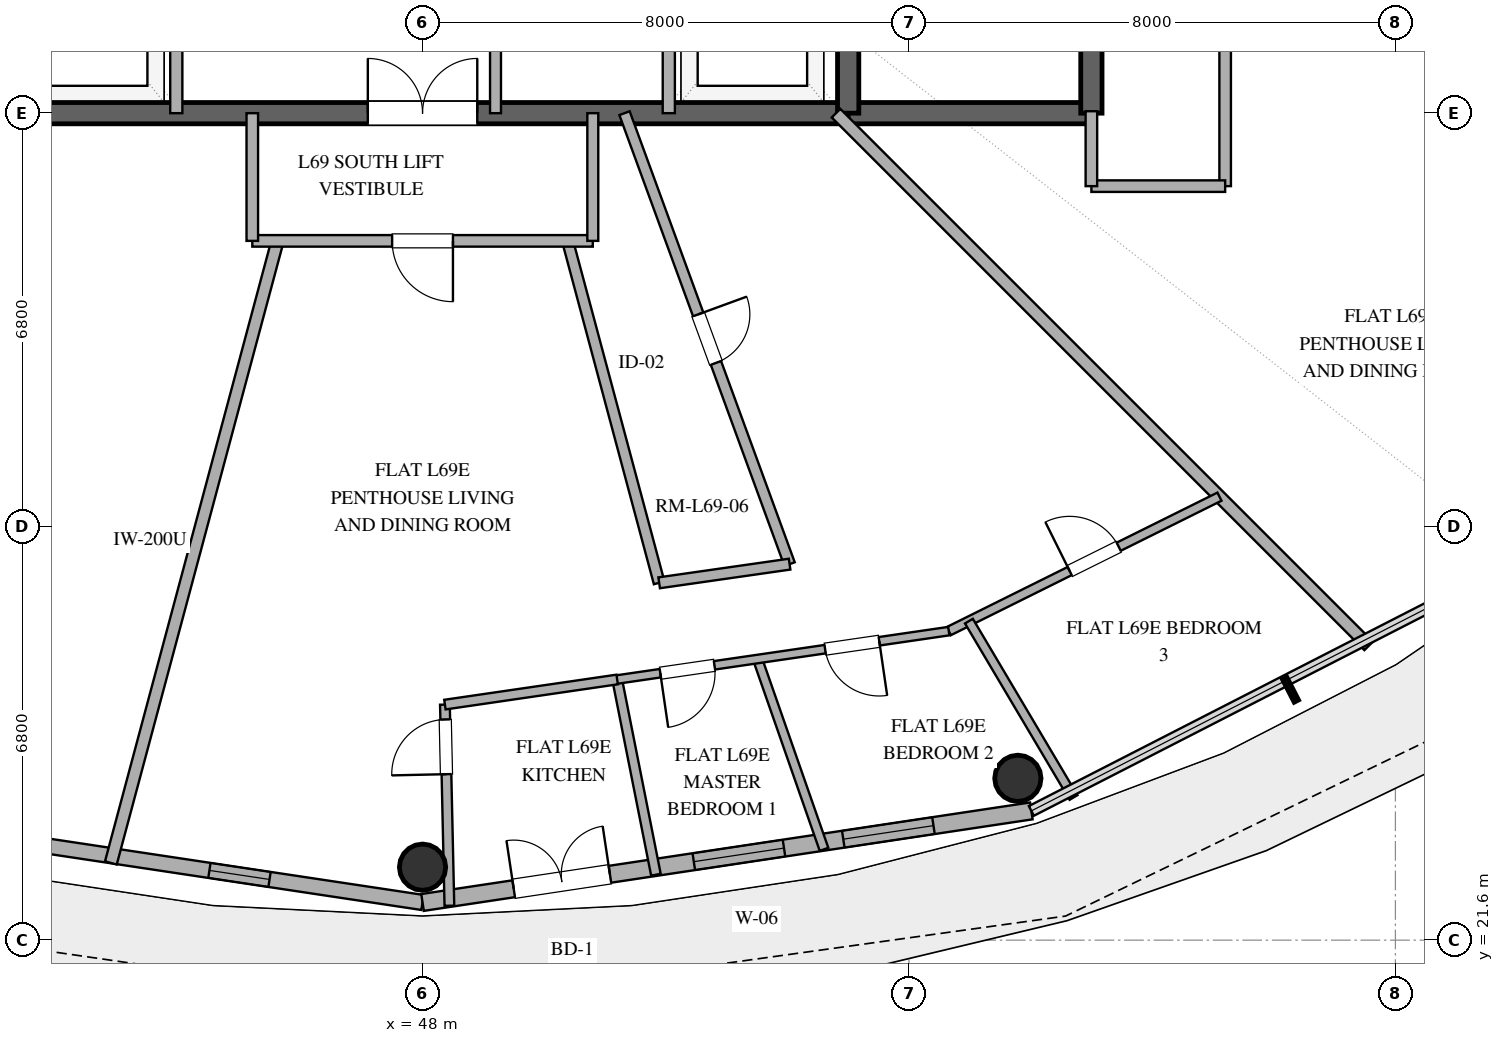
"""IFC4 building model, lengths in metres.
Left out: names, types, materials, properties, quantities, classifications, styles, units other than length and angle.
Written with IfcOpenShell. Run it as: python <this file> out.ifc"""

import sys

from ifc_helpers import new_model, si_unit, direction, frame, frame_2d, origin, origin_2d, place, context, subcontext, project, spatial, rectangle, hollow_circle, extrude, element, fill, save


model = new_model("IFC4")
c1 = context("Model", 3, precision=1e-05, world=origin(), true_north=direction((0.0, 1.0)))
c2 = subcontext(c1, "Body", "Model", "MODEL_VIEW")
j1 = project(units=[si_unit("LENGTHUNIT", "METRE"), si_unit("PLANEANGLEUNIT", "RADIAN")], contexts=[c1])
p1 = place(None, origin())
s1 = spatial("IfcSite", under=j1, at=p1, CompositionType="ELEMENT")
p2 = place(p1, origin())
s2 = spatial("IfcBuilding", under=s1, at=p2, CompositionType="ELEMENT")
p3 = place(p2, frame((0.0, 0.0, 269.4)))
s3 = spatial("IfcBuildingStorey", under=s2, at=p3, CompositionType="ELEMENT", Elevation=269.4)
p4 = place(p3, frame((41.0, 35.2, 0.0), z_axis=(0.0, 0.0, 1.0), x_axis=(1.0, 0.0, 0.0)))
e1 = element("IfcWall", 1, at=p4, inside=s3, PredefinedType="SHEAR", context=c2, shape_type="SweptSolid", body=[
    extrude(rectangle(XDim=14.0, YDim=0.35, at=frame_2d((7.0, 0.0))), origin(), (0.0, 0.0, 1.0), 3.37),
])
p5 = place(p4, frame((6.1, 0.0, 0.0)))
e2 = element("IfcOpeningElement", 2, at=p5, cuts=e1, PredefinedType="OPENING", context=c2, shape_type="SweptSolid", body=[
    extrude(rectangle(XDim=1.8, YDim=2.25, at=frame_2d((0.9, 1.125))), frame((0.0, 0.185, 0.0), z_axis=(0.0, -1.0, 0.0), x_axis=(1.0, 0.0, 0.0)), (0.0, 0.0, 1.0), 0.37),
])
p6 = place(p3, frame((55.0, 35.2, 0.0), z_axis=(0.0, 0.0, 1.0), x_axis=(1.0, 0.0, 0.0)))
e3 = element("IfcWall", 3, at=p6, inside=s3, PredefinedType="SHEAR", context=c2, shape_type="SweptSolid", body=[
    extrude(rectangle(XDim=4.0, YDim=0.35, at=frame_2d((2.0, 0.0))), origin(), (0.0, 0.0, 1.0), 3.37),
])
p7 = place(p3, frame((59.0, 35.2, 0.0), z_axis=(0.0, 0.0, 1.0), x_axis=(0.0, 1.0, 0.0)))
e4 = element("IfcWall", 4, at=p7, inside=s3, PredefinedType="SHEAR", context=c2, shape_type="SweptSolid", body=[
    extrude(rectangle(XDim=13.6, YDim=0.35, at=frame_2d((6.8, 0.0))), origin(), (0.0, 0.0, 1.0), 3.37),
])
p8 = place(p7, frame((1.5, 0.0, 0.0)))
e5 = element("IfcOpeningElement", 5, at=p8, cuts=e4, PredefinedType="OPENING", context=c2, shape_type="SweptSolid", body=[
    extrude(rectangle(XDim=1.2, YDim=2.15, at=frame_2d((0.6, 1.075))), frame((0.0, 0.185, 0.0), z_axis=(0.0, -1.0, 0.0), x_axis=(1.0, 0.0, 0.0)), (0.0, 0.0, 1.0), 0.37),
])
p9 = place(p3, frame((55.0, 35.2, 0.0), z_axis=(0.0, 0.0, 1.0), x_axis=(0.0, 1.0, 0.0)))
e6 = element("IfcWall", 6, at=p9, inside=s3, PredefinedType="SHEAR", context=c2, shape_type="SweptSolid", body=[
    extrude(rectangle(XDim=13.6, YDim=0.35, at=frame_2d((6.8, 0.0))), origin(), (0.0, 0.0, 1.0), 3.37),
])
p10 = place(p9, frame((1.15, 0.0, 0.0)))
e7 = element("IfcOpeningElement", 7, at=p10, cuts=e6, PredefinedType="OPENING", context=c2, shape_type="SweptSolid", body=[
    extrude(rectangle(XDim=1.1, YDim=2.2, at=frame_2d((0.55, 1.1))), frame((0.0, 0.185, 0.0), z_axis=(0.0, -1.0, 0.0), x_axis=(1.0, 0.0, 0.0)), (0.0, 0.0, 1.0), 0.37),
])
for number, where, z_axis, x_axis in (
    (8, (48.0, 22.8, 0.0), (0.0, 0.0, 1.0), (1.0, 0.0, 0.0)),
    (9, (57.791, 24.261, 0.0), (0.0, 0.0, 1.0), (1.0, 0.0, 0.0)),
):
    element("IfcColumn", number, at=place(p3, frame(where, z_axis=z_axis, x_axis=x_axis)), inside=s3, PredefinedType="COLUMN", context=c2, shape_type="SweptSolid", body=[
        extrude(hollow_circle(Radius=0.381, WallThickness=0.025, at=origin_2d()), origin(), (0.0, 0.0, 1.0), 3.37),
    ])
p11 = place(p3, frame((37.987, 23.726, 0.0), z_axis=(0.0, 0.0, 1.0), x_axis=(0.988882522213, -0.148698881169, 0.0)))
e10 = element("IfcWall", 10, at=p11, inside=s3, PredefinedType="SOLIDWALL", context=c2, shape_type="SweptSolid", body=[
    extrude(rectangle(XDim=10.125, YDim=0.25, at=frame_2d((5.062, 0.0))), origin(), (0.0, 0.0, 1.0), 3.37),
])
p12 = place(p11, frame((6.581, 0.0, 1.42)))
e11 = element("IfcOpeningElement", 11, at=p12, cuts=e10, PredefinedType="OPENING", context=c2, shape_type="SweptSolid", body=[
    extrude(rectangle(XDim=1.0, YDim=1.05, at=frame_2d((0.5, 0.525))), frame((0.0, 0.135, 0.0), z_axis=(0.0, -1.0, 0.0), x_axis=(1.0, 0.0, 0.0)), (0.0, 0.0, 1.0), 0.27),
])
p13 = place(p3, frame((48.0, 22.22, 0.0), z_axis=(0.0, 0.0, 1.0), x_axis=(0.988882522213, 0.148698881169, 0.0)))
e12 = element("IfcWall", 12, at=p13, inside=s3, PredefinedType="SOLIDWALL", context=c2, shape_type="SweptSolid", body=[
    extrude(rectangle(XDim=10.125, YDim=0.28, at=frame_2d((5.062, 0.0))), origin(), (0.0, 0.0, 1.0), 3.37),
])
p14 = place(p13, frame((1.516, 0.0, 0.0)))
e13 = element("IfcOpeningElement", 13, at=p14, cuts=e12, PredefinedType="OPENING", context=c2, shape_type="SweptSolid", body=[
    extrude(rectangle(XDim=1.6, YDim=2.25, at=frame_2d((0.8, 1.125))), frame((0.0, 0.15, 0.0), z_axis=(0.0, -1.0, 0.0), x_axis=(1.0, 0.0, 0.0)), (0.0, 0.0, 1.0), 0.3),
])
p15 = place(p13, frame((4.511, 0.0, 0.85)))
e14 = element("IfcOpeningElement", 14, at=p15, cuts=e12, PredefinedType="OPENING", context=c2, shape_type="SweptSolid", body=[
    extrude(rectangle(XDim=1.5, YDim=2.0, at=frame_2d((0.75, 1.0))), frame((0.0, 0.15, 0.0), z_axis=(0.0, -1.0, 0.0), x_axis=(1.0, 0.0, 0.0)), (0.0, 0.0, 1.0), 0.3),
])
p16 = place(p13, frame((6.997, 0.0, 0.85)))
e15 = element("IfcOpeningElement", 15, at=p16, cuts=e12, PredefinedType="OPENING", context=c2, shape_type="SweptSolid", body=[
    extrude(rectangle(XDim=1.5, YDim=1.8, at=frame_2d((0.75, 0.9))), frame((0.0, 0.15, 0.0), z_axis=(0.0, -1.0, 0.0), x_axis=(1.0, 0.0, 0.0)), (0.0, 0.0, 1.0), 0.3),
])
for number, where, z_axis, x_axis in (
    (16, (43.95, 35.2, 0.0), (0.0, 0.0, 1.0), (0.0, 1.0, 0.0)),
    (17, (52.05, 35.2, 0.0), (0.0, 0.0, 1.0), (0.0, 1.0, 0.0)),
):
    element("IfcWall", number, at=place(p3, frame(where, z_axis=z_axis, x_axis=x_axis)), inside=s3, PredefinedType="SOLIDWALL", context=c2, shape_type="SweptSolid", body=[
        extrude(rectangle(XDim=3.2, YDim=0.2, at=frame_2d((1.6, 0.0))), origin(), (0.0, 0.0, 1.0), 2.73),
    ])
p17 = place(p3, frame((49.2, 35.2, 0.0), z_axis=(0.0, 0.0, 1.0), x_axis=(0.0, 1.0, 0.0)))
e18 = element("IfcWall", 18, at=p17, inside=s3, PredefinedType="PLUMBINGWALL", context=c2, shape_type="SweptSolid", body=[
    extrude(rectangle(XDim=3.2, YDim=0.18, at=frame_2d((1.6, 0.0))), origin(), (0.0, 0.0, 1.0), 2.73),
])
p18 = place(p17, frame((1.15, 0.0, 0.0)))
e19 = element("IfcOpeningElement", 19, at=p18, cuts=e18, PredefinedType="OPENING", context=c2, shape_type="SweptSolid", body=[
    extrude(rectangle(XDim=0.9, YDim=2.1, at=frame_2d((0.45, 1.05))), frame((0.0, 0.1, 0.0), z_axis=(0.0, -1.0, 0.0), x_axis=(1.0, 0.0, 0.0)), (0.0, 0.0, 1.0), 0.2),
])
p19 = place(p3, frame((42.874, 22.87, 0.0), z_axis=(0.0, 0.0, 1.0), x_axis=(0.258827496332, 0.965923561749, 0.0)))
e20 = element("IfcWall", 20, at=p19, inside=s3, PredefinedType="PARTITIONING", context=c2, shape_type="SweptSolid", body=[
    extrude(rectangle(XDim=10.591, YDim=0.2, at=frame_2d((5.295, 0.0))), origin(), (0.0, 0.0, 1.0), 2.73),
])
p20 = place(p3, frame((63.561, 26.439, 0.0), z_axis=(0.0, 0.0, 1.0), x_axis=(-0.707106781187, 0.707106781187, 0.0)))
e21 = element("IfcWall", 21, at=p20, inside=s3, PredefinedType="PARTITIONING", context=c2, shape_type="SweptSolid", body=[
    extrude(rectangle(XDim=12.389, YDim=0.2, at=frame_2d((6.195, 0.0))), origin(), (0.0, 0.0, 1.0), 2.73),
])
p21 = place(p3, frame((51.322, 35.2, 0.0), z_axis=(0.0, 0.0, 1.0), x_axis=(0.343730484072, -0.939068343796, 0.0)))
e22 = element("IfcWall", 22, at=p21, inside=s3, PredefinedType="PLUMBINGWALL", context=c2, shape_type="SweptSolid", body=[
    extrude(rectangle(XDim=7.897, YDim=0.18, at=frame_2d((3.949, 0.0))), origin(), (0.0, 0.0, 1.0), 2.73),
])
p22 = place(p21, frame((3.524, 0.0, 0.0)))
e23 = element("IfcOpeningElement", 23, at=p22, cuts=e22, PredefinedType="OPENING", context=c2, shape_type="SweptSolid", body=[
    extrude(rectangle(XDim=0.85, YDim=2.1, at=frame_2d((0.425, 1.05))), frame((0.0, 0.1, 0.0), z_axis=(0.0, -1.0, 0.0), x_axis=(1.0, 0.0, 0.0)), (0.0, 0.0, 1.0), 0.2),
])
p23 = place(p3, frame((51.892, 27.477, 0.0), z_axis=(0.0, 0.0, 1.0), x_axis=(-0.258831810373, 0.965922405755, 0.0)))
e24 = element("IfcWall", 24, at=p23, inside=s3, PredefinedType="PLUMBINGWALL", context=c2, shape_type="SweptSolid", body=[
    extrude(rectangle(XDim=5.822, YDim=0.18, at=frame_2d((2.911, 0.0))), origin(), (0.0, 0.0, 1.0), 2.73),
])
p24 = place(p3, frame((50.8, 33.1, 0.0), z_axis=(0.0, 0.0, 1.0), x_axis=(-1.0, 0.0, 0.0)))
e25 = element("IfcWall", 25, at=p24, inside=s3, PredefinedType="PARTITIONING", context=c2, shape_type="SweptSolid", body=[
    extrude(rectangle(XDim=5.6, YDim=0.19, at=frame_2d((2.8, 0.0))), origin(), (0.0, 0.0, 1.0), 2.73),
])
p25 = place(p24, frame((2.3, 0.0, 0.0)))
e26 = element("IfcOpeningElement", 26, at=p25, cuts=e25, PredefinedType="OPENING", context=c2, shape_type="SweptSolid", body=[
    extrude(rectangle(XDim=1.0, YDim=2.2, at=frame_2d((0.5, 1.1))), frame((0.0, 0.105, 0.0), z_axis=(0.0, -1.0, 0.0), x_axis=(1.0, 0.0, 0.0)), (0.0, 0.0, 1.0), 0.21),
])
p26 = place(p3, frame((56.655, 26.682, 0.0), z_axis=(0.0, 0.0, 1.0), x_axis=(0.895583327025, 0.444893812449, 0.0)))
e27 = element("IfcWall", 27, at=p26, inside=s3, PredefinedType="PARTITIONING", context=c2, shape_type="SweptSolid", body=[
    extrude(rectangle(XDim=4.971, YDim=0.15, at=frame_2d((2.485, 0.0))), origin(), (0.0, 0.0, 1.0), 2.73),
])
p27 = place(p26, frame((2.22, 0.0, 0.0)))
e28 = element("IfcOpeningElement", 28, at=p27, cuts=e27, PredefinedType="OPENING", context=c2, shape_type="SweptSolid", body=[
    extrude(rectangle(XDim=0.9, YDim=2.1, at=frame_2d((0.45, 1.05))), frame((0.0, 0.085, 0.0), z_axis=(0.0, -1.0, 0.0), x_axis=(1.0, 0.0, 0.0)), (0.0, 0.0, 1.0), 0.17),
])
p28 = place(p3, frame((61.2, 38.496, 0.0), z_axis=(0.0, 0.0, 1.0), x_axis=(0.0, -1.0, 0.0)))
e29 = element("IfcWall", 29, at=p28, inside=s3, PredefinedType="PARTITIONING", context=c2, shape_type="SweptSolid", body=[
    extrude(rectangle(XDim=4.496, YDim=0.19, at=frame_2d((2.248, 0.0))), origin(), (0.0, 0.0, 1.0), 2.73),
])
p29 = place(p3, frame((58.706, 23.946, 0.0), z_axis=(0.0, 0.0, 1.0), x_axis=(-0.510016720958, 0.860164486795, 0.0)))
e30 = element("IfcWall", 30, at=p29, inside=s3, PredefinedType="PARTITIONING", context=c2, shape_type="SweptSolid", body=[
    extrude(rectangle(XDim=3.372, YDim=0.15, at=frame_2d((1.686, 0.0))), origin(), (0.0, 0.0, 1.0), 2.73),
])
p30 = place(p3, frame((53.51, 26.223, 0.0), z_axis=(0.0, 0.0, 1.0), x_axis=(0.329694293347, -0.944087746417, 0.0)))
e31 = element("IfcWall", 31, at=p30, inside=s3, PredefinedType="PARTITIONING", context=c2, shape_type="SweptSolid", body=[
    extrude(rectangle(XDim=3.315, YDim=0.15, at=frame_2d((1.658, 0.0))), origin(), (0.0, 0.0, 1.0), 2.73),
])
p31 = place(p3, frame((48.442, 22.166, 0.0), z_axis=(0.0, 0.0, 1.0), x_axis=(-0.022285576985, 0.999751645689, 0.0)))
e32 = element("IfcWall", 32, at=p31, inside=s3, PredefinedType="PLUMBINGWALL", context=c2, shape_type="SweptSolid", body=[
    extrude(rectangle(XDim=3.308, YDim=0.16, at=frame_2d((1.654, 0.0))), origin(), (0.0, 0.0, 1.0), 2.73),
])
p32 = place(p31, frame((2.164, 0.0, 0.0)))
e33 = element("IfcOpeningElement", 33, at=p32, cuts=e32, PredefinedType="OPENING", context=c2, shape_type="SweptSolid", body=[
    extrude(rectangle(XDim=0.9, YDim=2.1, at=frame_2d((0.45, 1.05))), frame((0.0, 0.09, 0.0), z_axis=(0.0, -1.0, 0.0), x_axis=(1.0, 0.0, 0.0)), (0.0, 0.0, 1.0), 0.18),
])
p33 = place(p3, frame((51.201, 25.887, 0.0), z_axis=(0.0, 0.0, 1.0), x_axis=(0.194810759156, -0.980840847496, 0.0)))
e34 = element("IfcWall", 34, at=p33, inside=s3, PredefinedType="PLUMBINGWALL", context=c2, shape_type="SweptSolid", body=[
    extrude(rectangle(XDim=3.273, YDim=0.16, at=frame_2d((1.637, 0.0))), origin(), (0.0, 0.0, 1.0), 2.73),
])
p34 = place(p3, frame((56.655, 26.682, 0.0), z_axis=(0.0, 0.0, 1.0), x_axis=(-0.989532194991, -0.144312283177, 0.0)))
e35 = element("IfcWall", 35, at=p34, inside=s3, PredefinedType="PARTITIONING", context=c2, shape_type="SweptSolid", body=[
    extrude(rectangle(XDim=5.544, YDim=0.14, at=frame_2d((2.772, 0.0))), origin(), (0.0, 0.0, 1.0), 2.73),
])
p35 = place(p34, frame((1.156, 0.0, 0.0)))
e36 = element("IfcOpeningElement", 36, at=p35, cuts=e35, PredefinedType="OPENING", context=c2, shape_type="SweptSolid", body=[
    extrude(rectangle(XDim=0.9, YDim=2.1, at=frame_2d((0.45, 1.05))), frame((0.0, 0.08, 0.0), z_axis=(0.0, -1.0, 0.0), x_axis=(1.0, 0.0, 0.0)), (0.0, 0.0, 1.0), 0.16),
])
p36 = place(p34, frame((3.895, 0.0, 0.0)))
e37 = element("IfcOpeningElement", 37, at=p36, cuts=e35, PredefinedType="OPENING", context=c2, shape_type="SweptSolid", body=[
    extrude(rectangle(XDim=0.9, YDim=2.1, at=frame_2d((0.45, 1.05))), frame((0.0, 0.08, 0.0), z_axis=(0.0, -1.0, 0.0), x_axis=(1.0, 0.0, 0.0)), (0.0, 0.0, 1.0), 0.16),
])
p37 = place(p3, frame((48.368, 25.474, 0.0), z_axis=(0.0, 0.0, 1.0), x_axis=(0.989534249572, 0.144298194456, 0.0)))
e38 = element("IfcWall", 38, at=p37, inside=s3, PredefinedType="PLUMBINGWALL", context=c2, shape_type="SweptSolid", body=[
    extrude(rectangle(XDim=2.863, YDim=0.16, at=frame_2d((1.431, 0.0))), origin(), (0.0, 0.0, 1.0), 2.73),
])
p38 = place(p3, frame((61.2, 34.0, 0.0), z_axis=(0.0, 0.0, 1.0), x_axis=(-1.0, 0.0, 0.0)))
e39 = element("IfcWall", 39, at=p38, inside=s3, PredefinedType="PARTITIONING", context=c2, shape_type="SweptSolid", body=[
    extrude(rectangle(XDim=2.2, YDim=0.19, at=frame_2d((1.1, 0.0))), origin(), (0.0, 0.0, 1.0), 2.73),
])
p39 = place(p3, frame((54.037, 27.784, 0.0), z_axis=(0.0, 0.0, 1.0), x_axis=(-0.989920178177, -0.141626412926, 0.0)))
e40 = element("IfcWall", 40, at=p39, inside=s3, PredefinedType="PLUMBINGWALL", context=c2, shape_type="SweptSolid", body=[
    extrude(rectangle(XDim=2.167, YDim=0.18, at=frame_2d((1.083, 0.0))), origin(), (0.0, 0.0, 1.0), 2.73),
])
p40 = place(p3, frame((45.2, 35.2, 0.0), z_axis=(0.0, 0.0, 1.0), x_axis=(0.0, -1.0, 0.0)))
e41 = element("IfcWall", 41, at=p40, inside=s3, PredefinedType="PARTITIONING", context=c2, shape_type="SweptSolid", body=[
    extrude(rectangle(XDim=2.1, YDim=0.19, at=frame_2d((1.05, 0.0))), origin(), (0.0, 0.0, 1.0), 2.73),
])
p41 = place(p3, frame((50.8, 35.2, 0.0), z_axis=(0.0, 0.0, 1.0), x_axis=(0.0, -1.0, 0.0)))
e42 = element("IfcWall", 42, at=p41, inside=s3, PredefinedType="PLUMBINGWALL", context=c2, shape_type="SweptSolid", body=[
    extrude(rectangle(XDim=2.1, YDim=0.18, at=frame_2d((1.05, 0.0))), origin(), (0.0, 0.0, 1.0), 2.73),
])
p42 = place(p3, frame((59.0, 34.0, 0.0), z_axis=(0.0, 0.0, 1.0), x_axis=(0.0, 1.0, 0.0)))
e43 = element("IfcWall", 43, at=p42, inside=s3, PredefinedType="PARTITIONING", context=c2, shape_type="SweptSolid", body=[
    extrude(rectangle(XDim=1.232, YDim=0.19, at=frame_2d((0.616, 0.0))), origin(), (0.0, 0.0, 1.0), 2.73),
])
p43 = place(p14, origin())
e44 = element("IfcDoor", 44, at=p43, inside=s3, OperationType="DOUBLE_DOOR_SINGLE_SWING", PredefinedType="DOOR", context=c2, shape_type="SweptSolid", body=[
    extrude(rectangle(XDim=1.6, YDim=2.25, at=frame_2d((0.8, 1.125))), frame((0.0, 0.025, 0.0), z_axis=(0.0, -1.0, 0.0), x_axis=(1.0, 0.0, 0.0)), (0.0, 0.0, 1.0), 0.05),
])
fill(e13, e44)
p44 = place(p15, origin())
e45 = element("IfcWindow", 45, at=p44, inside=s3, PartitioningType="SINGLE_PANEL", PredefinedType="WINDOW", context=c2, shape_type="SweptSolid", body=[
    extrude(rectangle(XDim=1.5, YDim=2.0, at=frame_2d((0.75, 1.0))), frame((0.0, 0.03, 0.0), z_axis=(0.0, -1.0, 0.0), x_axis=(1.0, 0.0, 0.0)), (0.0, 0.0, 1.0), 0.06),
])
fill(e14, e45)
p45 = place(p16, origin())
e46 = element("IfcWindow", 46, at=p45, inside=s3, PartitioningType="SINGLE_PANEL", PredefinedType="WINDOW", context=c2, shape_type="SweptSolid", body=[
    extrude(rectangle(XDim=1.5, YDim=1.8, at=frame_2d((0.75, 0.9))), frame((0.0, 0.03, 0.0), z_axis=(0.0, -1.0, 0.0), x_axis=(1.0, 0.0, 0.0)), (0.0, 0.0, 1.0), 0.06),
])
fill(e15, e46)
p46 = place(p12, origin())
e47 = element("IfcWindow", 47, at=p46, inside=s3, PartitioningType="SINGLE_PANEL", PredefinedType="WINDOW", context=c2, shape_type="SweptSolid", body=[
    extrude(rectangle(XDim=1.0, YDim=1.05, at=frame_2d((0.5, 0.525))), frame((0.0, 0.03, 0.0), z_axis=(0.0, -1.0, 0.0), x_axis=(1.0, 0.0, 0.0)), (0.0, 0.0, 1.0), 0.06),
])
fill(e11, e47)
p47 = place(p5, origin())
e48 = element("IfcDoor", 48, at=p47, inside=s3, OperationType="DOUBLE_DOOR_SINGLE_SWING", PredefinedType="DOOR", context=c2, shape_type="SweptSolid", body=[
    extrude(rectangle(XDim=1.8, YDim=2.25, at=frame_2d((0.9, 1.125))), frame((0.0, 0.025, 0.0), z_axis=(0.0, -1.0, 0.0), x_axis=(1.0, 0.0, 0.0)), (0.0, 0.0, 1.0), 0.05),
])
fill(e2, e48)
p48 = place(p22, origin())
e49 = element("IfcDoor", 49, at=p48, inside=s3, OperationType="SINGLE_SWING_LEFT", PredefinedType="DOOR", context=c2, shape_type="SweptSolid", body=[
    extrude(rectangle(XDim=0.85, YDim=2.1, at=frame_2d((0.425, 1.05))), frame((0.0, 0.025, 0.0), z_axis=(0.0, -1.0, 0.0), x_axis=(1.0, 0.0, 0.0)), (0.0, 0.0, 1.0), 0.05),
])
fill(e23, e49)
p49 = place(p25, origin())
e50 = element("IfcDoor", 50, at=p49, inside=s3, OperationType="SINGLE_SWING_LEFT", PredefinedType="DOOR", context=c2, shape_type="SweptSolid", body=[
    extrude(rectangle(XDim=1.0, YDim=2.2, at=frame_2d((0.5, 1.1))), frame((0.0, 0.025, 0.0), z_axis=(0.0, -1.0, 0.0), x_axis=(1.0, 0.0, 0.0)), (0.0, 0.0, 1.0), 0.05),
])
fill(e26, e50)
p50 = place(p27, origin())
e51 = element("IfcDoor", 51, at=p50, inside=s3, OperationType="SINGLE_SWING_LEFT", PredefinedType="DOOR", context=c2, shape_type="SweptSolid", body=[
    extrude(rectangle(XDim=0.9, YDim=2.1, at=frame_2d((0.45, 1.05))), frame((0.0, 0.025, 0.0), z_axis=(0.0, -1.0, 0.0), x_axis=(1.0, 0.0, 0.0)), (0.0, 0.0, 1.0), 0.05),
])
fill(e28, e51)
p51 = place(p32, origin())
e52 = element("IfcDoor", 52, at=p51, inside=s3, OperationType="SINGLE_SWING_LEFT", PredefinedType="DOOR", context=c2, shape_type="SweptSolid", body=[
    extrude(rectangle(XDim=0.9, YDim=2.1, at=frame_2d((0.45, 1.05))), frame((0.0, 0.025, 0.0), z_axis=(0.0, -1.0, 0.0), x_axis=(1.0, 0.0, 0.0)), (0.0, 0.0, 1.0), 0.05),
])
fill(e33, e52)
p52 = place(p35, origin())
e53 = element("IfcDoor", 53, at=p52, inside=s3, OperationType="SINGLE_SWING_LEFT", PredefinedType="DOOR", context=c2, shape_type="SweptSolid", body=[
    extrude(rectangle(XDim=0.9, YDim=2.1, at=frame_2d((0.45, 1.05))), frame((0.0, 0.025, 0.0), z_axis=(0.0, -1.0, 0.0), x_axis=(1.0, 0.0, 0.0)), (0.0, 0.0, 1.0), 0.05),
])
fill(e36, e53)
p53 = place(p36, origin())
e54 = element("IfcDoor", 54, at=p53, inside=s3, OperationType="SINGLE_SWING_RIGHT", PredefinedType="DOOR", context=c2, shape_type="SweptSolid", body=[
    extrude(rectangle(XDim=0.9, YDim=2.1, at=frame_2d((0.45, 1.05))), frame((0.0, 0.025, 0.0), z_axis=(0.0, -1.0, 0.0), x_axis=(1.0, 0.0, 0.0)), (0.0, 0.0, 1.0), 0.05),
])
fill(e37, e54)
save(model, sys.argv[1])
